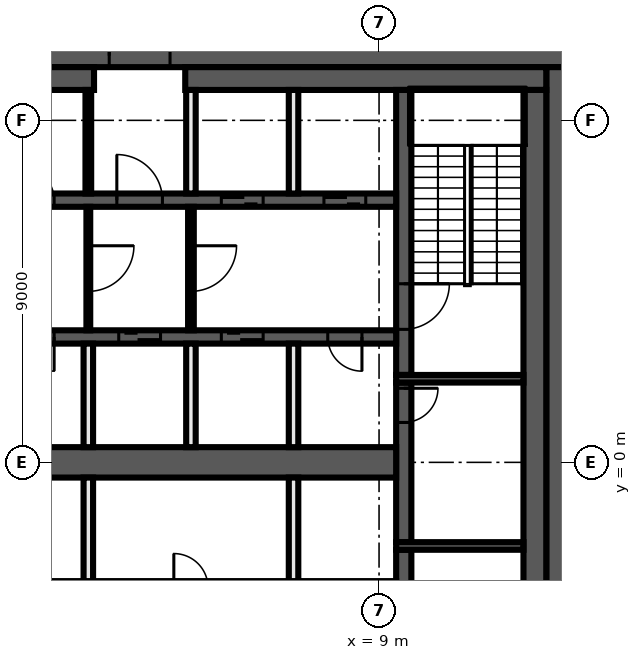
"""IFC4 building model, lengths in metres.
Left out: names, types, materials, properties, quantities, classifications, styles, units other than length and angle.
Written with IfcOpenShell. Run it as: python <this file> out.ifc"""

import sys

from ifc_helpers import new_model, si_unit, direction, frame, frame_2d, origin, place, context, subcontext, project, spatial, rectangle, extrude, element, fill, save


model = new_model("IFC4")
c1 = context("Model", 3, precision=1e-05, world=origin(), true_north=direction((0.0, 1.0)))
c2 = subcontext(c1, "Body", "Model", "MODEL_VIEW")
j1 = project(units=[si_unit("LENGTHUNIT", "METRE"), si_unit("PLANEANGLEUNIT", "RADIAN")], contexts=[c1])
p1 = place(None, origin())
s1 = spatial("IfcSite", under=j1, at=p1, CompositionType="ELEMENT")
p2 = place(p1, origin())
s2 = spatial("IfcBuilding", under=s1, at=p2, CompositionType="ELEMENT")
p3 = place(p2, frame((0.0, 0.0, 289.2)))
s3 = spatial("IfcBuildingStorey", under=s2, at=p3, CompositionType="ELEMENT", Elevation=289.2)
p4 = place(p3, frame((-14.0, 10.7, 0.0), z_axis=(0.0, 0.0, 1.0), x_axis=(1.0, 0.0, 0.0)))
e1 = element("IfcWall", 1, at=p4, inside=s3, PredefinedType="SHEAR", context=c2, shape_type="SweptSolid", body=[
    extrude(rectangle(XDim=28.0, YDim=0.6, at=frame_2d((14.0, 0.0))), origin(), (0.0, 0.0, 1.0), 4.62),
])
p5 = place(p4, frame((15.9, 0.0, 0.0)))
e2 = element("IfcOpeningElement", 2, at=p5, cuts=e1, PredefinedType="OPENING", context=c2, shape_type="SweptSolid", body=[
    extrude(rectangle(XDim=1.6, YDim=2.1, at=frame_2d((0.8, 1.05))), frame((0.0, 0.31, 0.0), z_axis=(0.0, -1.0, 0.0), x_axis=(1.0, 0.0, 0.0)), (0.0, 0.0, 1.0), 0.62),
])
p6 = place(p3, frame((13.7, 10.4, 0.0), z_axis=(0.0, 0.0, 1.0), x_axis=(0.0, -1.0, 0.0)))
e3 = element("IfcWall", 3, at=p6, inside=s3, PredefinedType="SHEAR", context=c2, shape_type="SweptSolid", body=[
    extrude(rectangle(XDim=20.8, YDim=0.6, at=frame_2d((10.4, 0.0))), origin(), (0.0, 0.0, 1.0), 4.62),
])
p7 = place(p3, frame((-13.4, 10.1, 0.0), z_axis=(0.0, 0.0, 1.0), x_axis=(1.0, 0.0, 0.0)))
e4 = element("IfcWall", 4, at=p7, inside=s3, PredefinedType="SHEAR", context=c2, shape_type="SweptSolid", body=[
    extrude(rectangle(XDim=14.9, YDim=0.6, at=frame_2d((7.45, 0.0))), origin(), (0.0, 0.0, 1.0), 4.62),
])
p8 = place(p3, frame((3.9, 10.1, 0.0), z_axis=(0.0, 0.0, 1.0), x_axis=(1.0, 0.0, 0.0)))
e5 = element("IfcWall", 5, at=p8, inside=s3, PredefinedType="SHEAR", context=c2, shape_type="SweptSolid", body=[
    extrude(rectangle(XDim=9.5, YDim=0.6, at=frame_2d((4.75, 0.0))), origin(), (0.0, 0.0, 1.0), 4.62),
])
p9 = place(p3, frame((13.1, 9.8, 0.0), z_axis=(0.0, 0.0, 1.0), x_axis=(0.0, -1.0, 0.0)))
e6 = element("IfcWall", 6, at=p9, inside=s3, PredefinedType="SHEAR", context=c2, shape_type="SweptSolid", body=[
    extrude(rectangle(XDim=19.6, YDim=0.6, at=frame_2d((9.8, 0.0))), origin(), (0.0, 0.0, 1.0), 4.62),
])
p10 = place(p3, frame((9.65, -2.3, 0.0), z_axis=(0.0, 0.0, 1.0), x_axis=(0.0, -1.0, 0.0)))
e7 = element("IfcWall", 7, at=p10, inside=s3, PredefinedType="SHEAR", context=c2, shape_type="SweptSolid", body=[
    extrude(rectangle(XDim=7.5, YDim=0.4, at=frame_2d((3.75, 0.0))), origin(), (0.0, 0.0, 1.0), 4.62),
])
p11 = place(p10, frame((1.2, 0.0, 0.0)))
e8 = element("IfcOpeningElement", 8, at=p11, cuts=e7, PredefinedType="OPENING", context=c2, shape_type="SweptSolid", body=[
    extrude(rectangle(XDim=1.2, YDim=2.1, at=frame_2d((0.6, 1.05))), frame((0.0, 0.21, 0.0), z_axis=(0.0, -1.0, 0.0), x_axis=(1.0, 0.0, 0.0)), (0.0, 0.0, 1.0), 0.42),
])
p12 = place(p3, frame((9.65, 2.1, 0.0), z_axis=(0.0, 0.0, 1.0), x_axis=(0.0, -1.0, 0.0)))
e9 = element("IfcWall", 9, at=p12, inside=s3, PredefinedType="SHEAR", context=c2, shape_type="SweptSolid", body=[
    extrude(rectangle(XDim=4.2, YDim=0.4, at=frame_2d((2.1, 0.0))), origin(), (0.0, 0.0, 1.0), 4.62),
])
p13 = place(p12, frame((0.15, 0.0, 0.0)))
e10 = element("IfcOpeningElement", 10, at=p13, cuts=e9, PredefinedType="OPENING", context=c2, shape_type="SweptSolid", body=[
    extrude(rectangle(XDim=0.9, YDim=2.1, at=frame_2d((0.45, 1.05))), frame((0.0, 0.21, 0.0), z_axis=(0.0, -1.0, 0.0), x_axis=(1.0, 0.0, 0.0)), (0.0, 0.0, 1.0), 0.42),
])
p14 = place(p3, frame((9.65, 9.8, 0.0), z_axis=(0.0, 0.0, 1.0), x_axis=(0.0, -1.0, 0.0)))
e11 = element("IfcWall", 11, at=p14, inside=s3, PredefinedType="SHEAR", context=c2, shape_type="SweptSolid", body=[
    extrude(rectangle(XDim=7.5, YDim=0.4, at=frame_2d((3.75, 0.0))), origin(), (0.0, 0.0, 1.0), 4.62),
])
p15 = place(p14, frame((5.1, 0.0, 0.0)))
e12 = element("IfcOpeningElement", 12, at=p15, cuts=e11, PredefinedType="OPENING", context=c2, shape_type="SweptSolid", body=[
    extrude(rectangle(XDim=1.2, YDim=2.1, at=frame_2d((0.6, 1.05))), frame((0.0, 0.21, 0.0), z_axis=(0.0, -1.0, 0.0), x_axis=(1.0, 0.0, 0.0)), (0.0, 0.0, 1.0), 0.42),
])
for number, where, z_axis, x_axis in (
    (13, (9.45, 2.2, 0.0), (0.0, 0.0, 1.0), (1.0, 0.0, 0.0)),
    (14, (9.45, -2.2, 0.0), (0.0, 0.0, 1.0), (1.0, 0.0, 0.0)),
):
    element("IfcWall", number, at=place(p3, frame(where, z_axis=z_axis, x_axis=x_axis)), inside=s3, PredefinedType="SHEAR", context=c2, shape_type="SweptSolid", body=[
        extrude(rectangle(XDim=3.35, YDim=0.2, at=frame_2d((1.675, 0.0))), origin(), (0.0, 0.0, 1.0), 4.62),
    ])
p16 = place(p3, frame((-9.45, 6.9, 0.0), z_axis=(0.0, 0.0, 1.0), x_axis=(1.0, 0.0, 0.0)))
e15 = element("IfcWall", 15, at=p16, inside=s3, PredefinedType="SHEAR", context=c2, shape_type="SweptSolid", body=[
    extrude(rectangle(XDim=18.9, YDim=0.35, at=frame_2d((9.45, 0.0))), origin(), (0.0, 0.0, 1.0), 4.62),
])
p17 = place(p16, frame((11.55, 0.0, 0.0)))
e16 = element("IfcOpeningElement", 16, at=p17, cuts=e15, PredefinedType="OPENING", context=c2, shape_type="SweptSolid", body=[
    extrude(rectangle(XDim=1.2, YDim=2.1, at=frame_2d((0.6, 1.05))), frame((0.0, 0.185, 0.0), z_axis=(0.0, -1.0, 0.0), x_axis=(1.0, 0.0, 0.0)), (0.0, 0.0, 1.0), 0.37),
])
p18 = place(p16, frame((14.3, 0.0, 0.0)))
e17 = element("IfcOpeningElement", 17, at=p18, cuts=e15, PredefinedType="OPENING", context=c2, shape_type="SweptSolid", body=[
    extrude(rectangle(XDim=1.1, YDim=2.1, at=frame_2d((0.55, 1.05))), frame((0.0, 0.185, 0.0), z_axis=(0.0, -1.0, 0.0), x_axis=(1.0, 0.0, 0.0)), (0.0, 0.0, 1.0), 0.37),
])
p19 = place(p16, frame((17.0, 0.0, 0.0)))
e18 = element("IfcOpeningElement", 18, at=p19, cuts=e15, PredefinedType="OPENING", context=c2, shape_type="SweptSolid", body=[
    extrude(rectangle(XDim=1.1, YDim=2.1, at=frame_2d((0.55, 1.05))), frame((0.0, 0.185, 0.0), z_axis=(0.0, -1.0, 0.0), x_axis=(1.0, 0.0, 0.0)), (0.0, 0.0, 1.0), 0.37),
])
p20 = place(p16, frame((0.9, 0.0, 0.0)))
e19 = element("IfcOpeningElement", 19, at=p20, cuts=e15, PredefinedType="OPENING", context=c2, shape_type="SweptSolid", body=[
    extrude(rectangle(XDim=0.9, YDim=2.1, at=frame_2d((0.45, 1.05))), frame((0.0, 0.185, 0.0), z_axis=(0.0, -1.0, 0.0), x_axis=(1.0, 0.0, 0.0)), (0.0, 0.0, 1.0), 0.37),
])
p21 = place(p16, frame((3.6, 0.0, 0.0)))
e20 = element("IfcOpeningElement", 20, at=p21, cuts=e15, PredefinedType="OPENING", context=c2, shape_type="SweptSolid", body=[
    extrude(rectangle(XDim=0.9, YDim=2.1, at=frame_2d((0.45, 1.05))), frame((0.0, 0.185, 0.0), z_axis=(0.0, -1.0, 0.0), x_axis=(1.0, 0.0, 0.0)), (0.0, 0.0, 1.0), 0.37),
])
p22 = place(p16, frame((6.3, 0.0, 0.0)))
e21 = element("IfcOpeningElement", 21, at=p22, cuts=e15, PredefinedType="OPENING", context=c2, shape_type="SweptSolid", body=[
    extrude(rectangle(XDim=0.9, YDim=2.1, at=frame_2d((0.45, 1.05))), frame((0.0, 0.185, 0.0), z_axis=(0.0, -1.0, 0.0), x_axis=(1.0, 0.0, 0.0)), (0.0, 0.0, 1.0), 0.37),
])
p23 = place(p16, frame((9.0, 0.0, 0.0)))
e22 = element("IfcOpeningElement", 22, at=p23, cuts=e15, PredefinedType="OPENING", context=c2, shape_type="SweptSolid", body=[
    extrude(rectangle(XDim=0.9, YDim=2.1, at=frame_2d((0.45, 1.05))), frame((0.0, 0.185, 0.0), z_axis=(0.0, -1.0, 0.0), x_axis=(1.0, 0.0, 0.0)), (0.0, 0.0, 1.0), 0.37),
])
p24 = place(p3, frame((9.45, 3.3, 0.0), z_axis=(0.0, 0.0, 1.0), x_axis=(-1.0, 0.0, 0.0)))
e23 = element("IfcWall", 23, at=p24, inside=s3, PredefinedType="SHEAR", context=c2, shape_type="SweptSolid", body=[
    extrude(rectangle(XDim=18.9, YDim=0.35, at=frame_2d((9.45, 0.0))), origin(), (0.0, 0.0, 1.0), 4.62),
])
p25 = place(p24, frame((6.2, 0.0, 0.0)))
e24 = element("IfcOpeningElement", 24, at=p25, cuts=e23, PredefinedType="OPENING", context=c2, shape_type="SweptSolid", body=[
    extrude(rectangle(XDim=1.1, YDim=2.1, at=frame_2d((0.55, 1.05))), frame((0.0, 0.185, 0.0), z_axis=(0.0, -1.0, 0.0), x_axis=(1.0, 0.0, 0.0)), (0.0, 0.0, 1.0), 0.37),
])
p26 = place(p24, frame((3.5, 0.0, 0.0)))
e25 = element("IfcOpeningElement", 25, at=p26, cuts=e23, PredefinedType="OPENING", context=c2, shape_type="SweptSolid", body=[
    extrude(rectangle(XDim=1.1, YDim=2.1, at=frame_2d((0.55, 1.05))), frame((0.0, 0.185, 0.0), z_axis=(0.0, -1.0, 0.0), x_axis=(1.0, 0.0, 0.0)), (0.0, 0.0, 1.0), 0.37),
])
p27 = place(p24, frame((0.9, 0.0, 0.0)))
e26 = element("IfcOpeningElement", 26, at=p27, cuts=e23, PredefinedType="OPENING", context=c2, shape_type="SweptSolid", body=[
    extrude(rectangle(XDim=0.9, YDim=2.1, at=frame_2d((0.45, 1.05))), frame((0.0, 0.185, 0.0), z_axis=(0.0, -1.0, 0.0), x_axis=(1.0, 0.0, 0.0)), (0.0, 0.0, 1.0), 0.37),
])
p28 = place(p24, frame((17.1, 0.0, 0.0)))
e27 = element("IfcOpeningElement", 27, at=p28, cuts=e23, PredefinedType="OPENING", context=c2, shape_type="SweptSolid", body=[
    extrude(rectangle(XDim=0.9, YDim=2.1, at=frame_2d((0.45, 1.05))), frame((0.0, 0.185, 0.0), z_axis=(0.0, -1.0, 0.0), x_axis=(1.0, 0.0, 0.0)), (0.0, 0.0, 1.0), 0.37),
])
p29 = place(p24, frame((13.05, 0.0, 0.0)))
e28 = element("IfcOpeningElement", 28, at=p29, cuts=e23, PredefinedType="OPENING", context=c2, shape_type="SweptSolid", body=[
    extrude(rectangle(XDim=0.9, YDim=2.1, at=frame_2d((0.45, 1.05))), frame((0.0, 0.185, 0.0), z_axis=(0.0, -1.0, 0.0), x_axis=(1.0, 0.0, 0.0)), (0.0, 0.0, 1.0), 0.37),
])
p30 = place(p24, frame((9.0, 0.0, 0.0)))
e29 = element("IfcOpeningElement", 29, at=p30, cuts=e23, PredefinedType="OPENING", context=c2, shape_type="SweptSolid", body=[
    extrude(rectangle(XDim=0.9, YDim=2.1, at=frame_2d((0.45, 1.05))), frame((0.0, 0.185, 0.0), z_axis=(0.0, -1.0, 0.0), x_axis=(1.0, 0.0, 0.0)), (0.0, 0.0, 1.0), 0.37),
])
p31 = place(p3, frame((-9.45, 0.0, 0.0), z_axis=(0.0, 0.0, 1.0), x_axis=(1.0, 0.0, 0.0)))
e30 = element("IfcWall", 30, at=p31, inside=s3, PredefinedType="SHEAR", context=c2, shape_type="SweptSolid", body=[
    extrude(rectangle(XDim=18.9, YDim=0.8, at=frame_2d((9.45, 0.0))), origin(), (0.0, 0.0, 1.0), 4.62),
])
for number, where, z_axis, x_axis in (
    (31, (6.75, -3.125, 0.0), (0.0, 0.0, 1.0), (0.0, 1.0, 0.0)),
    (32, (6.75, 0.4, 0.0), (0.0, 0.0, 1.0), (0.0, 1.0, 0.0)),
    (33, (6.75, 7.075, 0.0), (0.0, 0.0, 1.0), (0.0, 1.0, 0.0)),
):
    element("IfcWall", number, at=place(p3, frame(where, z_axis=z_axis, x_axis=x_axis)), inside=s3, PredefinedType="SOLIDWALL", context=c2, shape_type="SweptSolid", body=[
        extrude(rectangle(XDim=2.725, YDim=0.25, at=frame_2d((1.363, 0.0))), origin(), (0.0, 0.0, 1.0), 4.62),
    ])
p32 = place(p3, frame((4.05, 6.725, 0.0), z_axis=(0.0, 0.0, 1.0), x_axis=(0.0, -1.0, 0.0)))
e34 = element("IfcWall", 34, at=p32, inside=s3, PredefinedType="PARTITIONING", context=c2, shape_type="SweptSolid", body=[
    extrude(rectangle(XDim=3.25, YDim=0.15, at=frame_2d((1.625, 0.0))), origin(), (0.0, 0.0, 1.0), 4.62),
])
p33 = place(p32, frame((1.025, 0.0, 0.0)))
e35 = element("IfcOpeningElement", 35, at=p33, cuts=e34, PredefinedType="OPENING", context=c2, shape_type="SweptSolid", body=[
    extrude(rectangle(XDim=1.2, YDim=2.1, at=frame_2d((0.6, 1.05))), frame((0.0, 0.085, 0.0), z_axis=(0.0, -1.0, 0.0), x_axis=(1.0, 0.0, 0.0)), (0.0, 0.0, 1.0), 0.17),
])
for number, where, z_axis, x_axis in (
    (36, (4.05, 0.4, 0.0), (0.0, 0.0, 1.0), (0.0, 1.0, 0.0)),
    (37, (4.05, 7.075, 0.0), (0.0, 0.0, 1.0), (0.0, 1.0, 0.0)),
):
    element("IfcWall", number, at=place(p3, frame(where, z_axis=z_axis, x_axis=x_axis)), inside=s3, PredefinedType="SOLIDWALL", context=c2, shape_type="SweptSolid", body=[
        extrude(rectangle(XDim=2.725, YDim=0.25, at=frame_2d((1.363, 0.0))), origin(), (0.0, 0.0, 1.0), 4.62),
    ])
p34 = place(p3, frame((1.35, 7.075, 0.0), z_axis=(0.0, 0.0, 1.0), x_axis=(0.0, 1.0, 0.0)))
e38 = element("IfcWall", 38, at=p34, inside=s3, PredefinedType="PARTITIONING", context=c2, shape_type="SweptSolid", body=[
    extrude(rectangle(XDim=2.725, YDim=0.15, at=frame_2d((1.363, 0.0))), origin(), (0.0, 0.0, 1.0), 4.62),
])
p35 = place(p3, frame((1.35, 6.725, 0.0), z_axis=(0.0, 0.0, 1.0), x_axis=(0.0, -1.0, 0.0)))
e39 = element("IfcWall", 39, at=p35, inside=s3, PredefinedType="PARTITIONING", context=c2, shape_type="SweptSolid", body=[
    extrude(rectangle(XDim=3.25, YDim=0.1, at=frame_2d((1.625, 0.0))), origin(), (0.0, 0.0, 1.0), 4.62),
])
p36 = place(p35, frame((1.025, 0.0, 0.0)))
e40 = element("IfcOpeningElement", 40, at=p36, cuts=e39, PredefinedType="OPENING", context=c2, shape_type="SweptSolid", body=[
    extrude(rectangle(XDim=1.2, YDim=2.1, at=frame_2d((0.6, 1.05))), frame((0.0, 0.06, 0.0), z_axis=(0.0, -1.0, 0.0), x_axis=(1.0, 0.0, 0.0)), (0.0, 0.0, 1.0), 0.12),
])
for number, where, z_axis, x_axis in (
    (41, (1.35, -3.125, 0.0), (0.0, 0.0, 1.0), (0.0, 1.0, 0.0)),
    (42, (1.35, 0.4, 0.0), (0.0, 0.0, 1.0), (0.0, 1.0, 0.0)),
):
    element("IfcWall", number, at=place(p3, frame(where, z_axis=z_axis, x_axis=x_axis)), inside=s3, PredefinedType="SOLIDWALL", context=c2, shape_type="SweptSolid", body=[
        extrude(rectangle(XDim=2.725, YDim=0.25, at=frame_2d((1.363, 0.0))), origin(), (0.0, 0.0, 1.0), 4.62),
    ])
p37 = place(p13, origin())
e43 = element("IfcDoor", 43, at=p37, inside=s3, OperationType="SINGLE_SWING_RIGHT", PredefinedType="DOOR", context=c2, shape_type="SweptSolid", body=[
    extrude(rectangle(XDim=0.9, YDim=2.1, at=frame_2d((0.45, 1.05))), frame((0.0, 0.025, 0.0), z_axis=(0.0, -1.0, 0.0), x_axis=(1.0, 0.0, 0.0)), (0.0, 0.0, 1.0), 0.05),
])
fill(e10, e43)
p38 = place(p5, origin())
e44 = element("IfcDoor", 44, at=p38, inside=s3, OperationType="DOUBLE_DOOR_SINGLE_SWING", PredefinedType="DOOR", context=c2, shape_type="SweptSolid", body=[
    extrude(rectangle(XDim=1.6, YDim=2.1, at=frame_2d((0.8, 1.05))), frame((0.0, 0.025, 0.0), z_axis=(0.0, -1.0, 0.0), x_axis=(1.0, 0.0, 0.0)), (0.0, 0.0, 1.0), 0.05),
])
fill(e2, e44)
p39 = place(p17, origin())
e45 = element("IfcDoor", 45, at=p39, inside=s3, OperationType="SINGLE_SWING_LEFT", PredefinedType="DOOR", context=c2, shape_type="SweptSolid", body=[
    extrude(rectangle(XDim=1.2, YDim=2.1, at=frame_2d((0.6, 1.05))), frame((0.0, 0.025, 0.0), z_axis=(0.0, -1.0, 0.0), x_axis=(1.0, 0.0, 0.0)), (0.0, 0.0, 1.0), 0.05),
])
fill(e16, e45)
p40 = place(p18, origin())
e46 = element("IfcDoor", 46, at=p40, inside=s3, OperationType="DOUBLE_DOOR_SLIDING", PredefinedType="DOOR", context=c2, shape_type="SweptSolid", body=[
    extrude(rectangle(XDim=1.1, YDim=2.1, at=frame_2d((0.55, 1.05))), frame((0.0, 0.025, 0.0), z_axis=(0.0, -1.0, 0.0), x_axis=(1.0, 0.0, 0.0)), (0.0, 0.0, 1.0), 0.05),
])
fill(e17, e46)
p41 = place(p19, origin())
e47 = element("IfcDoor", 47, at=p41, inside=s3, OperationType="DOUBLE_DOOR_SLIDING", PredefinedType="DOOR", context=c2, shape_type="SweptSolid", body=[
    extrude(rectangle(XDim=1.1, YDim=2.1, at=frame_2d((0.55, 1.05))), frame((0.0, 0.025, 0.0), z_axis=(0.0, -1.0, 0.0), x_axis=(1.0, 0.0, 0.0)), (0.0, 0.0, 1.0), 0.05),
])
fill(e18, e47)
p42 = place(p25, origin())
e48 = element("IfcDoor", 48, at=p42, inside=s3, OperationType="DOUBLE_DOOR_SLIDING", PredefinedType="DOOR", context=c2, shape_type="SweptSolid", body=[
    extrude(rectangle(XDim=1.1, YDim=2.1, at=frame_2d((0.55, 1.05))), frame((0.0, 0.025, 0.0), z_axis=(0.0, -1.0, 0.0), x_axis=(1.0, 0.0, 0.0)), (0.0, 0.0, 1.0), 0.05),
])
fill(e24, e48)
p43 = place(p26, origin())
e49 = element("IfcDoor", 49, at=p43, inside=s3, OperationType="DOUBLE_DOOR_SLIDING", PredefinedType="DOOR", context=c2, shape_type="SweptSolid", body=[
    extrude(rectangle(XDim=1.1, YDim=2.1, at=frame_2d((0.55, 1.05))), frame((0.0, 0.025, 0.0), z_axis=(0.0, -1.0, 0.0), x_axis=(1.0, 0.0, 0.0)), (0.0, 0.0, 1.0), 0.05),
])
fill(e25, e49)
p44 = place(p27, origin())
e50 = element("IfcDoor", 50, at=p44, inside=s3, OperationType="SINGLE_SWING_LEFT", PredefinedType="DOOR", context=c2, shape_type="SweptSolid", body=[
    extrude(rectangle(XDim=0.9, YDim=2.1, at=frame_2d((0.45, 1.05))), frame((0.0, 0.025, 0.0), z_axis=(0.0, -1.0, 0.0), x_axis=(1.0, 0.0, 0.0)), (0.0, 0.0, 1.0), 0.05),
])
fill(e26, e50)
p45 = place(p23, origin())
e51 = element("IfcDoor", 51, at=p45, inside=s3, OperationType="SINGLE_SWING_LEFT", PredefinedType="DOOR", context=c2, shape_type="SweptSolid", body=[
    extrude(rectangle(XDim=0.9, YDim=2.1, at=frame_2d((0.45, 1.05))), frame((0.0, 0.025, 0.0), z_axis=(0.0, -1.0, 0.0), x_axis=(1.0, 0.0, 0.0)), (0.0, 0.0, 1.0), 0.05),
])
fill(e22, e51)
p46 = place(p30, origin())
e52 = element("IfcDoor", 52, at=p46, inside=s3, OperationType="SINGLE_SWING_RIGHT", PredefinedType="DOOR", context=c2, shape_type="SweptSolid", body=[
    extrude(rectangle(XDim=0.9, YDim=2.1, at=frame_2d((0.45, 1.05))), frame((0.0, 0.025, 0.0), z_axis=(0.0, -1.0, 0.0), x_axis=(1.0, 0.0, 0.0)), (0.0, 0.0, 1.0), 0.05),
])
fill(e29, e52)
p47 = place(p15, origin())
e53 = element("IfcDoor", 53, at=p47, inside=s3, OperationType="SINGLE_SWING_LEFT", PredefinedType="DOOR", context=c2, shape_type="SweptSolid", body=[
    extrude(rectangle(XDim=1.2, YDim=2.1, at=frame_2d((0.6, 1.05))), frame((0.0, 0.025, 0.0), z_axis=(0.0, -1.0, 0.0), x_axis=(1.0, 0.0, 0.0)), (0.0, 0.0, 1.0), 0.05),
])
fill(e12, e53)
p48 = place(p36, origin())
e54 = element("IfcDoor", 54, at=p48, inside=s3, OperationType="SINGLE_SWING_LEFT", PredefinedType="DOOR", context=c2, shape_type="SweptSolid", body=[
    extrude(rectangle(XDim=1.2, YDim=2.1, at=frame_2d((0.6, 1.05))), frame((0.0, 0.025, 0.0), z_axis=(0.0, -1.0, 0.0), x_axis=(1.0, 0.0, 0.0)), (0.0, 0.0, 1.0), 0.05),
])
fill(e40, e54)
p49 = place(p33, origin())
e55 = element("IfcDoor", 55, at=p49, inside=s3, OperationType="SINGLE_SWING_RIGHT", PredefinedType="DOOR", context=c2, shape_type="SweptSolid", body=[
    extrude(rectangle(XDim=1.2, YDim=2.1, at=frame_2d((0.6, 1.05))), frame((0.0, 0.025, 0.0), z_axis=(0.0, -1.0, 0.0), x_axis=(1.0, 0.0, 0.0)), (0.0, 0.0, 1.0), 0.05),
])
fill(e35, e55)
save(model, sys.argv[1])
